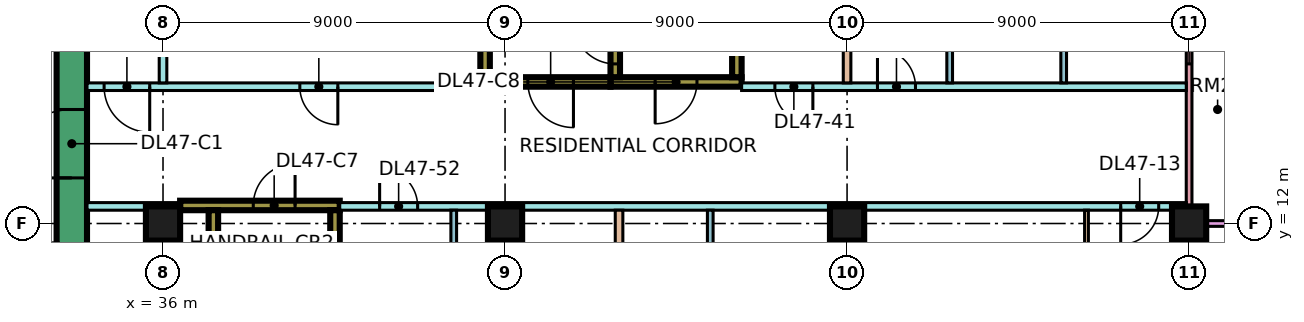
"""IFC4 building model, lengths in metres.
Left out: names, types, materials, properties, quantities, classifications, styles, units other than length and angle.
Written with IfcOpenShell. Run it as: python <this file> out.ifc"""

import sys

from ifc_helpers import new_model, si_unit, direction, frame, frame_2d, origin, origin_2d, place, context, subcontext, project, spatial, rectangle, extrude, element, fill, save


model = new_model("IFC4")
c1 = context("Model", 3, precision=1e-05, world=origin(), true_north=direction((0.0, 1.0)))
c2 = subcontext(c1, "Body", "Model", "MODEL_VIEW")
j1 = project(units=[si_unit("LENGTHUNIT", "METRE"), si_unit("PLANEANGLEUNIT", "RADIAN")], contexts=[c1])
p1 = place(None, origin())
s1 = spatial("IfcSite", under=j1, at=p1, CompositionType="ELEMENT")
p2 = place(p1, origin())
s2 = spatial("IfcBuilding", under=s1, at=p2, CompositionType="ELEMENT")
p3 = place(p2, frame((0.0, 0.0, 202.4)))
s3 = spatial("IfcBuildingStorey", under=s2, at=p3, CompositionType="ELEMENT", Elevation=202.4)
for number, where, z_axis, x_axis in (
    (1, (36.0, 12.0, 0.0), (0.0, 0.0, 1.0), (1.0, 0.0, 0.0)),
    (2, (45.0, 12.0, 0.0), (0.0, 0.0, 1.0), (1.0, 0.0, 0.0)),
    (3, (54.0, 12.0, 0.0), (0.0, 0.0, 1.0), (1.0, 0.0, 0.0)),
    (4, (63.0, 12.0, 0.0), (0.0, 0.0, 1.0), (1.0, 0.0, 0.0)),
):
    element("IfcColumn", number, at=place(p3, frame(where, z_axis=z_axis, x_axis=x_axis)), inside=s3, PredefinedType="COLUMN", context=c2, shape_type="SweptSolid", body=[
        extrude(rectangle(XDim=0.9, YDim=0.9, at=origin_2d()), origin(), (0.0, 0.0, 1.0), 3.75),
    ])
p4 = place(p3, frame((33.6, 7.8, 0.0), z_axis=(0.0, 0.0, 1.0), x_axis=(0.0, 1.0, 0.0)))
e5 = element("IfcWall", 5, at=p4, inside=s3, PredefinedType="SHEAR", context=c2, shape_type="SweptSolid", body=[
    extrude(rectangle(XDim=11.4, YDim=0.8, at=frame_2d((5.7, 0.0))), origin(), (0.0, 0.0, 1.0), 3.75),
])
p5 = place(p4, frame((5.4, 0.0, 0.0)))
e6 = element("IfcOpeningElement", 6, at=p5, cuts=e5, PredefinedType="OPENING", context=c2, shape_type="SweptSolid", body=[
    extrude(rectangle(XDim=1.8, YDim=2.4, at=frame_2d((0.9, 1.2))), frame((0.0, 0.41, 0.0), z_axis=(0.0, -1.0, 0.0), x_axis=(1.0, 0.0, 0.0)), (0.0, 0.0, 1.0), 0.82),
])
p6 = place(p3, frame((36.45, 12.475, 0.0), z_axis=(0.0, 0.0, 1.0), x_axis=(1.0, 0.0, 0.0)))
e7 = element("IfcWall", 7, at=p6, inside=s3, PredefinedType="SHEAR", context=c2, shape_type="SweptSolid", body=[
    extrude(rectangle(XDim=4.2, YDim=0.25, at=frame_2d((2.1, 0.0))), origin(), (0.0, 0.0, 1.0), 3.75),
])
p7 = place(p6, frame((1.925, 0.0, 0.0)))
e8 = element("IfcOpeningElement", 8, at=p7, cuts=e7, PredefinedType="OPENING", context=c2, shape_type="SweptSolid", body=[
    extrude(rectangle(XDim=1.1, YDim=2.2, at=frame_2d((0.55, 1.1))), frame((0.0, 0.135, 0.0), z_axis=(0.0, -1.0, 0.0), x_axis=(1.0, 0.0, 0.0)), (0.0, 0.0, 1.0), 0.27),
])
for number, where, z_axis, x_axis in (
    (9, (37.325, 5.85, 0.0), (0.0, 0.0, 1.0), (0.0, 1.0, 0.0)),
    (10, (40.525, 5.85, 0.0), (0.0, 0.0, 1.0), (0.0, 1.0, 0.0)),
):
    element("IfcWall", number, at=place(p3, frame(where, z_axis=z_axis, x_axis=x_axis)), inside=s3, PredefinedType="SHEAR", context=c2, shape_type="SweptSolid", body=[
        extrude(rectangle(XDim=6.5, YDim=0.25, at=frame_2d((3.25, 0.0))), origin(), (0.0, 0.0, 1.0), 3.75),
    ])
p8 = place(p3, frame((47.775, 15.725, 0.0), z_axis=(0.0, 0.0, 1.0), x_axis=(1.0, 0.0, 0.0)))
e11 = element("IfcWall", 11, at=p8, inside=s3, PredefinedType="SHEAR", context=c2, shape_type="SweptSolid", body=[
    extrude(rectangle(XDim=3.45, YDim=0.25, at=frame_2d((1.725, 0.0))), origin(), (0.0, 0.0, 1.0), 3.75),
])
p9 = place(p8, frame((1.175, 0.0, 0.0)))
e12 = element("IfcOpeningElement", 12, at=p9, cuts=e11, PredefinedType="OPENING", context=c2, shape_type="SweptSolid", body=[
    extrude(rectangle(XDim=1.1, YDim=2.2, at=frame_2d((0.55, 1.1))), frame((0.0, 0.135, 0.0), z_axis=(0.0, -1.0, 0.0), x_axis=(1.0, 0.0, 0.0)), (0.0, 0.0, 1.0), 0.27),
])
p10 = place(p3, frame((47.9, 15.85, 0.0), z_axis=(0.0, 0.0, 1.0), x_axis=(0.0, 1.0, 0.0)))
e13 = element("IfcWall", 13, at=p10, inside=s3, PredefinedType="SHEAR", context=c2, shape_type="SweptSolid", body=[
    extrude(rectangle(XDim=6.5, YDim=0.25, at=frame_2d((3.25, 0.0))), origin(), (0.0, 0.0, 1.0), 3.75),
])
p11 = place(p10, frame((0.35, 0.0, 0.0)))
e14 = element("IfcOpeningElement", 14, at=p11, cuts=e13, PredefinedType="OPENING", context=c2, shape_type="SweptSolid", body=[
    extrude(rectangle(XDim=1.1, YDim=2.2, at=frame_2d((0.55, 1.1))), frame((0.0, 0.135, 0.0), z_axis=(0.0, -1.0, 0.0), x_axis=(1.0, 0.0, 0.0)), (0.0, 0.0, 1.0), 0.27),
])
p12 = place(p3, frame((51.1, 15.85, 0.0), z_axis=(0.0, 0.0, 1.0), x_axis=(0.0, 1.0, 0.0)))
e15 = element("IfcWall", 15, at=p12, inside=s3, PredefinedType="SHEAR", context=c2, shape_type="SweptSolid", body=[
    extrude(rectangle(XDim=6.5, YDim=0.25, at=frame_2d((3.25, 0.0))), origin(), (0.0, 0.0, 1.0), 3.75),
])
p13 = place(p3, frame((44.35, 15.725, 0.0), z_axis=(0.0, 0.0, 1.0), x_axis=(1.0, 0.0, 0.0)))
e16 = element("IfcWall", 16, at=p13, inside=s3, PredefinedType="SHEAR", context=c2, shape_type="SweptSolid", body=[
    extrude(rectangle(XDim=3.425, YDim=0.25, at=frame_2d((1.712, 0.0))), origin(), (0.0, 0.0, 1.0), 3.75),
])
p14 = place(p13, frame((1.25, 0.0, 0.0)))
e17 = element("IfcOpeningElement", 17, at=p14, cuts=e16, PredefinedType="OPENING", context=c2, shape_type="SweptSolid", body=[
    extrude(rectangle(XDim=1.2, YDim=2.2, at=frame_2d((0.6, 1.1))), frame((0.0, 0.135, 0.0), z_axis=(0.0, -1.0, 0.0), x_axis=(1.0, 0.0, 0.0)), (0.0, 0.0, 1.0), 0.27),
])
p15 = place(p3, frame((44.475, 15.85, 0.0), z_axis=(0.0, 0.0, 1.0), x_axis=(0.0, 1.0, 0.0)))
e18 = element("IfcWall", 18, at=p15, inside=s3, PredefinedType="SHEAR", context=c2, shape_type="SweptSolid", body=[
    extrude(rectangle(XDim=6.5, YDim=0.25, at=frame_2d((3.25, 0.0))), origin(), (0.0, 0.0, 1.0), 3.75),
])
p16 = place(p15, frame((1.75, 0.0, 0.0)))
e19 = element("IfcOpeningElement", 19, at=p16, cuts=e18, PredefinedType="OPENING", context=c2, shape_type="SweptSolid", body=[
    extrude(rectangle(XDim=1.1, YDim=2.2, at=frame_2d((0.55, 1.1))), frame((0.0, 0.135, 0.0), z_axis=(0.0, -1.0, 0.0), x_axis=(1.0, 0.0, 0.0)), (0.0, 0.0, 1.0), 0.27),
])
p17 = place(p15, frame((4.3, 0.0, 0.0)))
e20 = element("IfcOpeningElement", 20, at=p17, cuts=e18, PredefinedType="OPENING", context=c2, shape_type="SweptSolid", body=[
    extrude(rectangle(XDim=1.1, YDim=2.2, at=frame_2d((0.55, 1.1))), frame((0.0, 0.135, 0.0), z_axis=(0.0, -1.0, 0.0), x_axis=(1.0, 0.0, 0.0)), (0.0, 0.0, 1.0), 0.27),
])
p18 = place(p3, frame((63.0, 12.075, 0.0), z_axis=(0.0, 0.0, 1.0), x_axis=(0.0, 1.0, 0.0)))
e21 = element("IfcWall", 21, at=p18, inside=s3, PredefinedType="SOLIDWALL", context=c2, shape_type="SweptSolid", body=[
    extrude(rectangle(XDim=10.35, YDim=0.15, at=frame_2d((5.175, 0.0))), origin(), (0.0, 0.0, 1.0), 3.3),
])
p19 = place(p18, frame((4.125, 0.0, 0.45)))
e22 = element("IfcOpeningElement", 22, at=p19, cuts=e21, PredefinedType="OPENING", context=c2, shape_type="SweptSolid", body=[
    extrude(rectangle(XDim=1.8, YDim=2.4, at=frame_2d((0.9, 1.2))), frame((0.0, 0.085, 0.0), z_axis=(0.0, -1.0, 0.0), x_axis=(1.0, 0.0, 0.0)), (0.0, 0.0, 1.0), 0.17),
])
p20 = place(p18, frame((8.137, 0.0, 0.45)))
e23 = element("IfcOpeningElement", 23, at=p20, cuts=e21, PredefinedType="OPENING", context=c2, shape_type="SweptSolid", body=[
    extrude(rectangle(XDim=1.8, YDim=2.4, at=frame_2d((0.9, 1.2))), frame((0.0, 0.085, 0.0), z_axis=(0.0, -1.0, 0.0), x_axis=(1.0, 0.0, 0.0)), (0.0, 0.0, 1.0), 0.17),
])
p21 = place(p3, frame((64.5, 12.0, 0.0), z_axis=(0.0, 0.0, 1.0), x_axis=(-1.0, 0.0, 0.0)))
e24 = element("IfcWall", 24, at=p21, inside=s3, PredefinedType="SOLIDWALL", context=c2, shape_type="SweptSolid", body=[
    extrude(rectangle(XDim=1.5, YDim=0.15, at=frame_2d((0.75, 0.0))), origin(), (0.0, 0.0, 1.0), 3.3),
])
p22 = place(p3, frame((34.0, 12.45, 0.0), z_axis=(0.0, 0.0, 1.0), x_axis=(1.0, 0.0, 0.0)))
e25 = element("IfcWall", 25, at=p22, inside=s3, PredefinedType="PARTITIONING", context=c2, shape_type="SweptSolid", body=[
    extrude(rectangle(XDim=2.451, YDim=0.2, at=frame_2d((1.226, 0.0))), origin(), (0.0, 0.0, 1.0), 3.3),
])
p23 = place(p3, frame((34.0, 15.6, 0.0), z_axis=(0.0, 0.0, 1.0), x_axis=(1.0, 0.0, 0.0)))
e26 = element("IfcWall", 26, at=p23, inside=s3, PredefinedType="PARTITIONING", context=c2, shape_type="SweptSolid", body=[
    extrude(rectangle(XDim=10.35, YDim=0.2, at=frame_2d((5.175, 0.0))), origin(), (0.0, 0.0, 1.0), 3.3),
])
p24 = place(p23, frame((5.6, 0.0, 0.0)))
e27 = element("IfcOpeningElement", 27, at=p24, cuts=e26, PredefinedType="OPENING", context=c2, shape_type="SweptSolid", body=[
    extrude(rectangle(XDim=1.0, YDim=2.1, at=frame_2d((0.5, 1.05))), frame((0.0, 0.11, 0.0), z_axis=(0.0, -1.0, 0.0), x_axis=(1.0, 0.0, 0.0)), (0.0, 0.0, 1.0), 0.22),
])
p25 = place(p23, frame((0.45, 0.0, 0.0)))
e28 = element("IfcOpeningElement", 28, at=p25, cuts=e26, PredefinedType="OPENING", context=c2, shape_type="SweptSolid", body=[
    extrude(rectangle(XDim=1.2, YDim=2.1, at=frame_2d((0.6, 1.05))), frame((0.0, 0.11, 0.0), z_axis=(0.0, -1.0, 0.0), x_axis=(1.0, 0.0, 0.0)), (0.0, 0.0, 1.0), 0.22),
])
p26 = place(p3, frame((36.0, 15.7, 0.0), z_axis=(0.0, 0.0, 1.0), x_axis=(0.0, 1.0, 0.0)))
e29 = element("IfcWall", 29, at=p26, inside=s3, PredefinedType="PARTITIONING", context=c2, shape_type="SweptSolid", body=[
    extrude(rectangle(XDim=8.3, YDim=0.2, at=frame_2d((4.15, 0.0))), origin(), (0.0, 0.0, 1.0), 3.3),
])
p27 = place(p3, frame((40.65, 12.45, 0.0), z_axis=(0.0, 0.0, 1.0), x_axis=(1.0, 0.0, 0.0)))
e30 = element("IfcWall", 30, at=p27, inside=s3, PredefinedType="PARTITIONING", context=c2, shape_type="SweptSolid", body=[
    extrude(rectangle(XDim=22.276, YDim=0.2, at=frame_2d((11.138, 0.0))), origin(), (0.0, 0.0, 1.0), 3.3),
])
p28 = place(p27, frame((20.55, 0.0, 0.0)))
e31 = element("IfcOpeningElement", 31, at=p28, cuts=e30, PredefinedType="OPENING", context=c2, shape_type="SweptSolid", body=[
    extrude(rectangle(XDim=1.0, YDim=2.1, at=frame_2d((0.5, 1.05))), frame((0.0, 0.11, 0.0), z_axis=(0.0, -1.0, 0.0), x_axis=(1.0, 0.0, 0.0)), (0.0, 0.0, 1.0), 0.22),
])
p29 = place(p27, frame((1.05, 0.0, 0.0)))
e32 = element("IfcOpeningElement", 32, at=p29, cuts=e30, PredefinedType="OPENING", context=c2, shape_type="SweptSolid", body=[
    extrude(rectangle(XDim=1.0, YDim=2.1, at=frame_2d((0.5, 1.05))), frame((0.0, 0.11, 0.0), z_axis=(0.0, -1.0, 0.0), x_axis=(1.0, 0.0, 0.0)), (0.0, 0.0, 1.0), 0.22),
])
p30 = place(p3, frame((43.65, 5.825, 0.0), z_axis=(0.0, 0.0, 1.0), x_axis=(0.0, 1.0, 0.0)))
e33 = element("IfcWall", 33, at=p30, inside=s3, PredefinedType="PARTITIONING", context=c2, shape_type="SweptSolid", body=[
    extrude(rectangle(XDim=6.525, YDim=0.15, at=frame_2d((3.263, 0.0))), origin(), (0.0, 0.0, 1.0), 3.3),
])
p31 = place(p30, frame((4.425, 0.0, 0.0)))
e34 = element("IfcOpeningElement", 34, at=p31, cuts=e33, PredefinedType="OPENING", context=c2, shape_type="SweptSolid", body=[
    extrude(rectangle(XDim=0.9, YDim=2.1, at=frame_2d((0.45, 1.05))), frame((0.0, 0.085, 0.0), z_axis=(0.0, -1.0, 0.0), x_axis=(1.0, 0.0, 0.0)), (0.0, 0.0, 1.0), 0.17),
])
p32 = place(p3, frame((48.0, 0.0, 0.0), z_axis=(0.0, 0.0, 1.0), x_axis=(0.0, 1.0, 0.0)))
e35 = element("IfcWall", 35, at=p32, inside=s3, PredefinedType="PARTITIONING", context=c2, shape_type="SweptSolid", body=[
    extrude(rectangle(XDim=12.35, YDim=0.2, at=frame_2d((6.175, 0.0))), origin(), (0.0, 0.0, 1.0), 3.3),
])
p33 = place(p3, frame((50.4, 7.725, 0.0), z_axis=(0.0, 0.0, 1.0), x_axis=(0.0, 1.0, 0.0)))
e36 = element("IfcWall", 36, at=p33, inside=s3, PredefinedType="PARTITIONING", context=c2, shape_type="SweptSolid", body=[
    extrude(rectangle(XDim=4.625, YDim=0.15, at=frame_2d((2.312, 0.0))), origin(), (0.0, 0.0, 1.0), 3.3),
])
p34 = place(p3, frame((51.225, 15.6, 0.0), z_axis=(0.0, 0.0, 1.0), x_axis=(1.0, 0.0, 0.0)))
e37 = element("IfcWall", 37, at=p34, inside=s3, PredefinedType="PARTITIONING", context=c2, shape_type="SweptSolid", body=[
    extrude(rectangle(XDim=11.701, YDim=0.2, at=frame_2d((5.851, 0.0))), origin(), (0.0, 0.0, 1.0), 3.3),
])
p35 = place(p34, frame((3.575, 0.0, 0.0)))
e38 = element("IfcOpeningElement", 38, at=p35, cuts=e37, PredefinedType="OPENING", context=c2, shape_type="SweptSolid", body=[
    extrude(rectangle(XDim=1.0, YDim=2.1, at=frame_2d((0.5, 1.05))), frame((0.0, 0.11, 0.0), z_axis=(0.0, -1.0, 0.0), x_axis=(1.0, 0.0, 0.0)), (0.0, 0.0, 1.0), 0.22),
])
p36 = place(p34, frame((0.875, 0.0, 0.0)))
e39 = element("IfcOpeningElement", 39, at=p36, cuts=e37, PredefinedType="OPENING", context=c2, shape_type="SweptSolid", body=[
    extrude(rectangle(XDim=1.0, YDim=2.1, at=frame_2d((0.5, 1.05))), frame((0.0, 0.11, 0.0), z_axis=(0.0, -1.0, 0.0), x_axis=(1.0, 0.0, 0.0)), (0.0, 0.0, 1.0), 0.22),
])
p37 = place(p3, frame((54.0, 7.725, 0.0), z_axis=(0.0, 0.0, 1.0), x_axis=(0.0, 1.0, 0.0)))
e40 = element("IfcWall", 40, at=p37, inside=s3, PredefinedType="PARTITIONING", context=c2, shape_type="SweptSolid", body=[
    extrude(rectangle(XDim=4.625, YDim=0.15, at=frame_2d((2.312, 0.0))), origin(), (0.0, 0.0, 1.0), 3.3),
])
p38 = place(p3, frame((54.0, 15.7, 0.0), z_axis=(0.0, 0.0, 1.0), x_axis=(0.0, 1.0, 0.0)))
e41 = element("IfcWall", 41, at=p38, inside=s3, PredefinedType="PARTITIONING", context=c2, shape_type="SweptSolid", body=[
    extrude(rectangle(XDim=8.3, YDim=0.2, at=frame_2d((4.15, 0.0))), origin(), (0.0, 0.0, 1.0), 3.3),
])
for number, where, z_axis, x_axis in (
    (42, (56.7, 15.7, 0.0), (0.0, 0.0, 1.0), (0.0, 1.0, 0.0)),
    (43, (59.7, 15.7, 0.0), (0.0, 0.0, 1.0), (0.0, 1.0, 0.0)),
):
    element("IfcWall", number, at=place(p3, frame(where, z_axis=z_axis, x_axis=x_axis)), inside=s3, PredefinedType="PARTITIONING", context=c2, shape_type="SweptSolid", body=[
        extrude(rectangle(XDim=2.825, YDim=0.15, at=frame_2d((1.413, 0.0))), origin(), (0.0, 0.0, 1.0), 3.3),
    ])
p39 = place(p3, frame((60.3, 7.725, 0.0), z_axis=(0.0, 0.0, 1.0), x_axis=(0.0, 1.0, 0.0)))
e44 = element("IfcWall", 44, at=p39, inside=s3, PredefinedType="PARTITIONING", context=c2, shape_type="SweptSolid", body=[
    extrude(rectangle(XDim=4.625, YDim=0.1, at=frame_2d((2.312, 0.0))), origin(), (0.0, 0.0, 1.0), 3.3),
])
p40 = place(p39, frame((1.875, 0.0, 0.0)))
e45 = element("IfcOpeningElement", 45, at=p40, cuts=e44, PredefinedType="OPENING", context=c2, shape_type="SweptSolid", body=[
    extrude(rectangle(XDim=0.9, YDim=2.1, at=frame_2d((0.45, 1.05))), frame((0.0, 0.06, 0.0), z_axis=(0.0, -1.0, 0.0), x_axis=(1.0, 0.0, 0.0)), (0.0, 0.0, 1.0), 0.12),
])
p41 = place(p19, origin())
e46 = element("IfcWindow", 46, at=p41, inside=s3, PartitioningType="SINGLE_PANEL", PredefinedType="WINDOW", context=c2, shape_type="SweptSolid", body=[
    extrude(rectangle(XDim=1.8, YDim=2.4, at=frame_2d((0.9, 1.2))), frame((0.0, 0.03, 0.0), z_axis=(0.0, -1.0, 0.0), x_axis=(1.0, 0.0, 0.0)), (0.0, 0.0, 1.0), 0.06),
])
fill(e22, e46)
p42 = place(p5, origin())
e47 = element("IfcDoor", 47, at=p42, inside=s3, OperationType="DOUBLE_DOOR_SINGLE_SWING", PredefinedType="DOOR", context=c2, shape_type="SweptSolid", body=[
    extrude(rectangle(XDim=1.8, YDim=2.4, at=frame_2d((0.9, 1.2))), frame((0.0, 0.025, 0.0), z_axis=(0.0, -1.0, 0.0), x_axis=(1.0, 0.0, 0.0)), (0.0, 0.0, 1.0), 0.05),
])
fill(e6, e47)
p43 = place(p7, frame((1.1, 0.0, 0.0), z_axis=(0.0, 0.0, 1.0), x_axis=(-1.0, 0.0, 0.0)))
e48 = element("IfcDoor", 48, at=p43, inside=s3, OperationType="SINGLE_SWING_RIGHT", PredefinedType="DOOR", context=c2, shape_type="SweptSolid", body=[
    extrude(rectangle(XDim=1.1, YDim=2.2, at=frame_2d((0.55, 1.1))), frame((0.0, 0.025, 0.0), z_axis=(0.0, -1.0, 0.0), x_axis=(1.0, 0.0, 0.0)), (0.0, 0.0, 1.0), 0.05),
])
fill(e8, e48)
p44 = place(p9, frame((1.1, 0.0, 0.0), z_axis=(0.0, 0.0, 1.0), x_axis=(-1.0, 0.0, 0.0)))
e49 = element("IfcDoor", 49, at=p44, inside=s3, OperationType="SINGLE_SWING_LEFT", PredefinedType="DOOR", context=c2, shape_type="SweptSolid", body=[
    extrude(rectangle(XDim=1.1, YDim=2.2, at=frame_2d((0.55, 1.1))), frame((0.0, 0.025, 0.0), z_axis=(0.0, -1.0, 0.0), x_axis=(1.0, 0.0, 0.0)), (0.0, 0.0, 1.0), 0.05),
])
fill(e12, e49)
p45 = place(p14, origin())
e50 = element("IfcDoor", 50, at=p45, inside=s3, OperationType="SINGLE_SWING_RIGHT", PredefinedType="DOOR", context=c2, shape_type="SweptSolid", body=[
    extrude(rectangle(XDim=1.2, YDim=2.2, at=frame_2d((0.6, 1.1))), frame((0.0, 0.025, 0.0), z_axis=(0.0, -1.0, 0.0), x_axis=(1.0, 0.0, 0.0)), (0.0, 0.0, 1.0), 0.05),
])
fill(e17, e50)
p46 = place(p11, frame((1.1, 0.0, 0.0), z_axis=(0.0, 0.0, 1.0), x_axis=(-1.0, 0.0, 0.0)))
e51 = element("IfcDoor", 51, at=p46, inside=s3, OperationType="SINGLE_SWING_RIGHT", PredefinedType="DOOR", context=c2, shape_type="SweptSolid", body=[
    extrude(rectangle(XDim=1.1, YDim=2.2, at=frame_2d((0.55, 1.1))), frame((0.0, 0.025, 0.0), z_axis=(0.0, -1.0, 0.0), x_axis=(1.0, 0.0, 0.0)), (0.0, 0.0, 1.0), 0.05),
])
fill(e14, e51)
p47 = place(p24, origin())
e52 = element("IfcDoor", 52, at=p47, inside=s3, OperationType="SINGLE_SWING_RIGHT", PredefinedType="DOOR", context=c2, shape_type="SweptSolid", body=[
    extrude(rectangle(XDim=1.0, YDim=2.1, at=frame_2d((0.5, 1.05))), frame((0.0, 0.025, 0.0), z_axis=(0.0, -1.0, 0.0), x_axis=(1.0, 0.0, 0.0)), (0.0, 0.0, 1.0), 0.05),
])
fill(e27, e52)
p48 = place(p35, origin())
e53 = element("IfcDoor", 53, at=p48, inside=s3, OperationType="SINGLE_SWING_LEFT", PredefinedType="DOOR", context=c2, shape_type="SweptSolid", body=[
    extrude(rectangle(XDim=1.0, YDim=2.1, at=frame_2d((0.5, 1.05))), frame((0.0, 0.025, 0.0), z_axis=(0.0, -1.0, 0.0), x_axis=(1.0, 0.0, 0.0)), (0.0, 0.0, 1.0), 0.05),
])
fill(e38, e53)
p49 = place(p28, frame((1.0, 0.0, 0.0), z_axis=(0.0, 0.0, 1.0), x_axis=(-1.0, 0.0, 0.0)))
e54 = element("IfcDoor", 54, at=p49, inside=s3, OperationType="SINGLE_SWING_LEFT", PredefinedType="DOOR", context=c2, shape_type="SweptSolid", body=[
    extrude(rectangle(XDim=1.0, YDim=2.1, at=frame_2d((0.5, 1.05))), frame((0.0, 0.025, 0.0), z_axis=(0.0, -1.0, 0.0), x_axis=(1.0, 0.0, 0.0)), (0.0, 0.0, 1.0), 0.05),
])
fill(e31, e54)
p50 = place(p25, origin())
e55 = element("IfcDoor", 55, at=p50, inside=s3, OperationType="SINGLE_SWING_RIGHT", PredefinedType="DOOR", context=c2, shape_type="SweptSolid", body=[
    extrude(rectangle(XDim=1.2, YDim=2.1, at=frame_2d((0.6, 1.05))), frame((0.0, 0.025, 0.0), z_axis=(0.0, -1.0, 0.0), x_axis=(1.0, 0.0, 0.0)), (0.0, 0.0, 1.0), 0.05),
])
fill(e28, e55)
p51 = place(p36, origin())
e56 = element("IfcDoor", 56, at=p51, inside=s3, OperationType="SINGLE_SWING_RIGHT", PredefinedType="DOOR", context=c2, shape_type="SweptSolid", body=[
    extrude(rectangle(XDim=1.0, YDim=2.1, at=frame_2d((0.5, 1.05))), frame((0.0, 0.025, 0.0), z_axis=(0.0, -1.0, 0.0), x_axis=(1.0, 0.0, 0.0)), (0.0, 0.0, 1.0), 0.05),
])
fill(e39, e56)
p52 = place(p29, origin())
e57 = element("IfcDoor", 57, at=p52, inside=s3, OperationType="SINGLE_SWING_LEFT", PredefinedType="DOOR", context=c2, shape_type="SweptSolid", body=[
    extrude(rectangle(XDim=1.0, YDim=2.1, at=frame_2d((0.5, 1.05))), frame((0.0, 0.025, 0.0), z_axis=(0.0, -1.0, 0.0), x_axis=(1.0, 0.0, 0.0)), (0.0, 0.0, 1.0), 0.05),
])
fill(e32, e57)
save(model, sys.argv[1])
